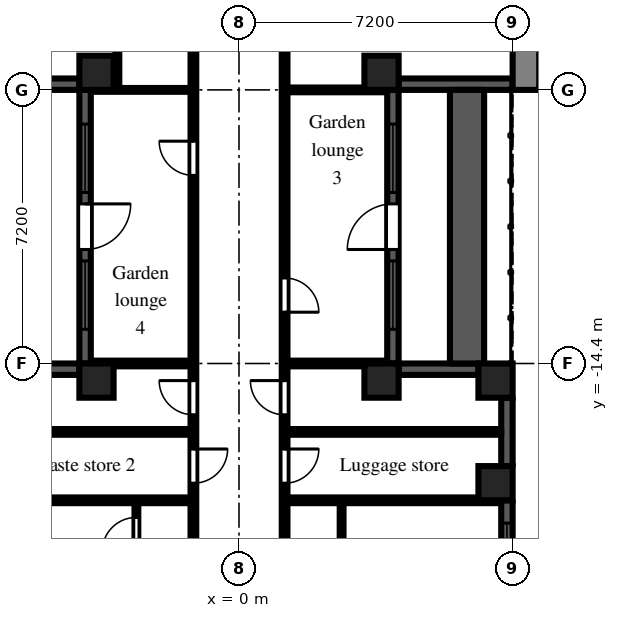
"""IFC4 building model, lengths in metres.
Left out: names, types, materials, properties, quantities, classifications, styles, units other than length and angle.
Written with IfcOpenShell. Run it as: python <this file> out.ifc"""

import sys

from ifc_helpers import new_model, si_unit, direction, frame, frame_2d, origin, origin_2d, place, context, subcontext, project, spatial, rectangle, extrude, element, fill, save


model = new_model("IFC4")
c1 = context("Model", 3, precision=1e-05, world=origin(), true_north=direction((0.0, 1.0)))
c2 = subcontext(c1, "Body", "Model", "MODEL_VIEW")
j1 = project(units=[si_unit("LENGTHUNIT", "METRE"), si_unit("PLANEANGLEUNIT", "RADIAN")], contexts=[c1])
p1 = place(None, origin())
s1 = spatial("IfcSite", under=j1, at=p1, CompositionType="ELEMENT")
p2 = place(p1, origin())
s2 = spatial("IfcBuilding", under=s1, at=p2, CompositionType="ELEMENT")
p3 = place(p2, frame((0.0, 0.0, 108.9)))
s3 = spatial("IfcBuildingStorey", under=s2, at=p3, CompositionType="ELEMENT", Elevation=108.9)
for number, where, z_axis, x_axis in (
    (1, (-3.75, -14.85, 0.0), (0.0, 0.0, 1.0), (1.0, 0.0, 0.0)),
    (2, (-3.75, -6.75, 0.0), (0.0, 0.0, 1.0), (1.0, 0.0, 0.0)),
    (3, (3.75, -14.85, 0.0), (0.0, 0.0, 1.0), (1.0, 0.0, 0.0)),
    (4, (3.75, -6.75, 0.0), (0.0, 0.0, 1.0), (1.0, 0.0, 0.0)),
    (5, (6.75, -17.55, 0.0), (0.0, 0.0, 1.0), (1.0, 0.0, 0.0)),
    (6, (6.75, -14.85, 0.0), (0.0, 0.0, 1.0), (1.0, 0.0, 0.0)),
):
    element("IfcColumn", number, at=place(p3, frame(where, z_axis=z_axis, x_axis=x_axis)), inside=s3, PredefinedType="COLUMN", context=c2, shape_type="SweptSolid", body=[
        extrude(rectangle(XDim=0.9, YDim=0.9, at=origin_2d()), origin(), (0.0, 0.0, 1.0), 3.0),
    ])
p4 = place(p3, frame((-7.2, -7.05, 0.0), z_axis=(0.0, 0.0, 1.0), x_axis=(1.0, 0.0, 0.0)))
e7 = element("IfcWall", 7, at=p4, inside=s3, PredefinedType="SOLIDWALL", context=c2, shape_type="SweptSolid", body=[
    extrude(rectangle(XDim=3.0, YDim=0.3, at=frame_2d((1.5, 0.0))), origin(), (0.0, 0.0, 1.0), 2.55),
])
p5 = place(p3, frame((-4.05, -7.2, 0.0), z_axis=(0.0, 0.0, 1.0), x_axis=(0.0, -1.0, 0.0)))
e8 = element("IfcWall", 8, at=p5, inside=s3, PredefinedType="SOLIDWALL", context=c2, shape_type="SweptSolid", body=[
    extrude(rectangle(XDim=7.2, YDim=0.3, at=frame_2d((3.6, 0.0))), origin(), (0.0, 0.0, 1.0), 2.55),
])
p6 = place(p5, frame((3.0, 0.0, 0.0)))
e9 = element("IfcOpeningElement", 9, at=p6, cuts=e8, PredefinedType="OPENING", context=c2, shape_type="SweptSolid", body=[
    extrude(rectangle(XDim=1.2, YDim=2.05, at=frame_2d((0.6, 1.025))), frame((0.0, 0.16, 0.0), z_axis=(0.0, -1.0, 0.0), x_axis=(1.0, 0.0, 0.0)), (0.0, 0.0, 1.0), 0.32),
])
p7 = place(p5, frame((0.9, 0.0, 0.2)))
e10 = element("IfcOpeningElement", 10, at=p7, cuts=e8, PredefinedType="OPENING", context=c2, shape_type="SweptSolid", body=[
    extrude(rectangle(XDim=1.8, YDim=1.85, at=frame_2d((0.9, 0.925))), frame((0.0, 0.16, 0.0), z_axis=(0.0, -1.0, 0.0), x_axis=(1.0, 0.0, 0.0)), (0.0, 0.0, 1.0), 0.32),
])
p8 = place(p5, frame((4.5, 0.0, 0.2)))
e11 = element("IfcOpeningElement", 11, at=p8, cuts=e8, PredefinedType="OPENING", context=c2, shape_type="SweptSolid", body=[
    extrude(rectangle(XDim=1.8, YDim=1.85, at=frame_2d((0.9, 0.925))), frame((0.0, 0.16, 0.0), z_axis=(0.0, -1.0, 0.0), x_axis=(1.0, 0.0, 0.0)), (0.0, 0.0, 1.0), 0.32),
])
p9 = place(p3, frame((-4.2, -14.55, 0.0), z_axis=(0.0, 0.0, 1.0), x_axis=(-1.0, 0.0, 0.0)))
e12 = element("IfcWall", 12, at=p9, inside=s3, PredefinedType="SOLIDWALL", context=c2, shape_type="SweptSolid", body=[
    extrude(rectangle(XDim=2.1, YDim=0.3, at=frame_2d((1.05, 0.0))), origin(), (0.0, 0.0, 1.0), 2.55),
])
p10 = place(p3, frame((7.05, -21.15, 0.0), z_axis=(0.0, 0.0, 1.0), x_axis=(0.0, 1.0, 0.0)))
e13 = element("IfcWall", 13, at=p10, inside=s3, PredefinedType="SOLIDWALL", context=c2, shape_type="SweptSolid", body=[
    extrude(rectangle(XDim=3.15, YDim=0.3, at=frame_2d((1.575, 0.0))), origin(), (0.0, 0.0, 1.0), 2.2),
])
p11 = place(p10, frame((0.15, 0.0, 0.2)))
e14 = element("IfcOpeningElement", 14, at=p11, cuts=e13, PredefinedType="OPENING", context=c2, shape_type="SweptSolid", body=[
    extrude(rectangle(XDim=2.4, YDim=1.85, at=frame_2d((1.2, 0.925))), frame((0.0, 0.16, 0.0), z_axis=(0.0, -1.0, 0.0), x_axis=(1.0, 0.0, 0.0)), (0.0, 0.0, 1.0), 0.32),
])
p12 = place(p3, frame((7.05, -17.1, 0.0), z_axis=(0.0, 0.0, 1.0), x_axis=(0.0, 1.0, 0.0)))
e15 = element("IfcWall", 15, at=p12, inside=s3, PredefinedType="SOLIDWALL", context=c2, shape_type="SweptSolid", body=[
    extrude(rectangle(XDim=1.8, YDim=0.3, at=frame_2d((0.9, 0.0))), origin(), (0.0, 0.0, 1.0), 2.2),
])
p13 = place(p3, frame((6.3, -14.55, 0.0), z_axis=(0.0, 0.0, 1.0), x_axis=(-1.0, 0.0, 0.0)))
e16 = element("IfcWall", 16, at=p13, inside=s3, PredefinedType="SOLIDWALL", context=c2, shape_type="SweptSolid", body=[
    extrude(rectangle(XDim=2.1, YDim=0.3, at=frame_2d((1.05, 0.0))), origin(), (0.0, 0.0, 1.0), 2.55),
])
p14 = place(p3, frame((4.05, -14.4, 0.0), z_axis=(0.0, 0.0, 1.0), x_axis=(0.0, 1.0, 0.0)))
e17 = element("IfcWall", 17, at=p14, inside=s3, PredefinedType="SOLIDWALL", context=c2, shape_type="SweptSolid", body=[
    extrude(rectangle(XDim=7.2, YDim=0.3, at=frame_2d((3.6, 0.0))), origin(), (0.0, 0.0, 1.0), 2.55),
])
p15 = place(p14, frame((3.0, 0.0, 0.0)))
e18 = element("IfcOpeningElement", 18, at=p15, cuts=e17, PredefinedType="OPENING", context=c2, shape_type="SweptSolid", body=[
    extrude(rectangle(XDim=1.2, YDim=2.05, at=frame_2d((0.6, 1.025))), frame((0.0, 0.16, 0.0), z_axis=(0.0, -1.0, 0.0), x_axis=(1.0, 0.0, 0.0)), (0.0, 0.0, 1.0), 0.32),
])
p16 = place(p14, frame((0.9, 0.0, 0.2)))
e19 = element("IfcOpeningElement", 19, at=p16, cuts=e17, PredefinedType="OPENING", context=c2, shape_type="SweptSolid", body=[
    extrude(rectangle(XDim=1.8, YDim=1.85, at=frame_2d((0.9, 0.925))), frame((0.0, 0.16, 0.0), z_axis=(0.0, -1.0, 0.0), x_axis=(1.0, 0.0, 0.0)), (0.0, 0.0, 1.0), 0.32),
])
p17 = place(p14, frame((4.5, 0.0, 0.2)))
e20 = element("IfcOpeningElement", 20, at=p17, cuts=e17, PredefinedType="OPENING", context=c2, shape_type="SweptSolid", body=[
    extrude(rectangle(XDim=1.8, YDim=1.85, at=frame_2d((0.9, 0.925))), frame((0.0, 0.16, 0.0), z_axis=(0.0, -1.0, 0.0), x_axis=(1.0, 0.0, 0.0)), (0.0, 0.0, 1.0), 0.32),
])
p18 = place(p3, frame((4.2, -7.05, 0.0), z_axis=(0.0, 0.0, 1.0), x_axis=(1.0, 0.0, 0.0)))
e21 = element("IfcWall", 21, at=p18, inside=s3, PredefinedType="SOLIDWALL", context=c2, shape_type="SweptSolid", body=[
    extrude(rectangle(XDim=3.0, YDim=0.3, at=frame_2d((1.5, 0.0))), origin(), (0.0, 0.0, 1.0), 2.55),
])
p19 = place(p3, frame((6.0, -14.4, 0.0), z_axis=(0.0, 0.0, 1.0), x_axis=(0.0, 1.0, 0.0)))
e22 = element("IfcWall", 22, at=p19, inside=s3, PredefinedType="PARAPET", context=c2, shape_type="SweptSolid", body=[
    extrude(rectangle(XDim=7.2, YDim=0.9, at=frame_2d((3.6, 0.0))), origin(), (0.0, 0.0, 1.0), 0.8),
])
p20 = place(p3, frame((7.55, -7.2, 0.0), z_axis=(0.0, 0.0, 1.0), x_axis=(0.0, 1.0, 0.0)))
e23 = element("IfcWall", 23, at=p20, inside=s3, PredefinedType="SHEAR", context=c2, shape_type="SweptSolid", body=[
    extrude(rectangle(XDim=14.4, YDim=0.7, at=frame_2d((7.2, 0.0))), origin(), (0.0, 0.0, 1.0), 2.55),
])
p21 = place(p20, frame((6.0, 0.0, 0.0)))
e24 = element("IfcOpeningElement", 24, at=p21, cuts=e23, PredefinedType="OPENING", context=c2, shape_type="SweptSolid", body=[
    extrude(rectangle(XDim=2.4, YDim=2.2, at=frame_2d((1.2, 1.1))), frame((0.0, 0.36, 0.0), z_axis=(0.0, -1.0, 0.0), x_axis=(1.0, 0.0, 0.0)), (0.0, 0.0, 1.0), 0.72),
])
for number, where, z_axis, x_axis in (
    (25, (-6.9, -18.0, 0.0), (0.0, 0.0, 1.0), (1.0, 0.0, 0.0)),
    (26, (-6.9, -16.2, 0.0), (0.0, 0.0, 1.0), (1.0, 0.0, 0.0)),
):
    element("IfcWall", number, at=place(p3, frame(where, z_axis=z_axis, x_axis=x_axis)), inside=s3, PredefinedType="PARTITIONING", context=c2, shape_type="SweptSolid", body=[
        extrude(rectangle(XDim=5.625, YDim=0.15, at=frame_2d((2.812, 0.0))), origin(), (0.0, 0.0, 1.0), 2.55),
    ])
p22 = place(p3, frame((-3.9, -14.4, 0.0), z_axis=(0.0, 0.0, 1.0), x_axis=(1.0, 0.0, 0.0)))
e27 = element("IfcWall", 27, at=p22, inside=s3, PredefinedType="PARTITIONING", context=c2, shape_type="SweptSolid", body=[
    extrude(rectangle(XDim=2.625, YDim=0.15, at=frame_2d((1.312, 0.0))), origin(), (0.0, 0.0, 1.0), 2.55),
])
p23 = place(p3, frame((-3.9, -7.2, 0.0), z_axis=(0.0, 0.0, 1.0), x_axis=(1.0, 0.0, 0.0)))
e28 = element("IfcWall", 28, at=p23, inside=s3, PredefinedType="PARTITIONING", context=c2, shape_type="SweptSolid", body=[
    extrude(rectangle(XDim=2.625, YDim=0.1, at=frame_2d((1.312, 0.0))), origin(), (0.0, 0.0, 1.0), 2.55),
])
p24 = place(p3, frame((-3.2, -7.15, 0.0), z_axis=(0.0, 0.0, 1.0), x_axis=(0.0, 1.0, 0.0)))
e29 = element("IfcWall", 29, at=p24, inside=s3, PredefinedType="PARTITIONING", context=c2, shape_type="SweptSolid", body=[
    extrude(rectangle(XDim=5.875, YDim=0.1, at=frame_2d((2.938, 0.0))), origin(), (0.0, 0.0, 1.0), 2.55),
])
p25 = place(p3, frame((-2.7, -32.35, 0.0), z_axis=(0.0, 0.0, 1.0), x_axis=(0.0, 1.0, 0.0)))
e30 = element("IfcWall", 30, at=p25, inside=s3, PredefinedType="PARTITIONING", context=c2, shape_type="SweptSolid", body=[
    extrude(rectangle(XDim=14.275, YDim=0.1, at=frame_2d((7.138, 0.0))), origin(), (0.0, 0.0, 1.0), 2.55),
])
p26 = place(p25, frame((0.4, 0.0, 0.0)))
e31 = element("IfcOpeningElement", 31, at=p26, cuts=e30, PredefinedType="OPENING", context=c2, shape_type="SweptSolid", body=[
    extrude(rectangle(XDim=0.9, YDim=2.1, at=frame_2d((0.45, 1.05))), frame((0.0, 0.06, 0.0), z_axis=(0.0, -1.0, 0.0), x_axis=(1.0, 0.0, 0.0)), (0.0, 0.0, 1.0), 0.12),
])
p27 = place(p25, frame((5.8, 0.0, 0.0)))
e32 = element("IfcOpeningElement", 32, at=p27, cuts=e30, PredefinedType="OPENING", context=c2, shape_type="SweptSolid", body=[
    extrude(rectangle(XDim=0.9, YDim=2.1, at=frame_2d((0.45, 1.05))), frame((0.0, 0.06, 0.0), z_axis=(0.0, -1.0, 0.0), x_axis=(1.0, 0.0, 0.0)), (0.0, 0.0, 1.0), 0.12),
])
p28 = place(p25, frame((7.6, 0.0, 0.0)))
e33 = element("IfcOpeningElement", 33, at=p28, cuts=e30, PredefinedType="OPENING", context=c2, shape_type="SweptSolid", body=[
    extrude(rectangle(XDim=0.9, YDim=2.1, at=frame_2d((0.45, 1.05))), frame((0.0, 0.06, 0.0), z_axis=(0.0, -1.0, 0.0), x_axis=(1.0, 0.0, 0.0)), (0.0, 0.0, 1.0), 0.12),
])
p29 = place(p25, frame((13.0, 0.0, 0.0)))
e34 = element("IfcOpeningElement", 34, at=p29, cuts=e30, PredefinedType="OPENING", context=c2, shape_type="SweptSolid", body=[
    extrude(rectangle(XDim=0.9, YDim=2.1, at=frame_2d((0.45, 1.05))), frame((0.0, 0.06, 0.0), z_axis=(0.0, -1.0, 0.0), x_axis=(1.0, 0.0, 0.0)), (0.0, 0.0, 1.0), 0.12),
])
p30 = place(p3, frame((-1.2, -36.5, 0.0), z_axis=(0.0, 0.0, 1.0), x_axis=(0.0, 1.0, 0.0)))
e35 = element("IfcWall", 35, at=p30, inside=s3, PredefinedType="PARTITIONING", context=c2, shape_type="SweptSolid", body=[
    extrude(rectangle(XDim=35.225, YDim=0.15, at=frame_2d((17.613, 0.0))), origin(), (0.0, 0.0, 1.0), 2.55),
])
p31 = place(p30, frame((31.85, 0.0, 0.0)))
e36 = element("IfcOpeningElement", 36, at=p31, cuts=e35, PredefinedType="OPENING", context=c2, shape_type="SweptSolid", body=[
    extrude(rectangle(XDim=0.9, YDim=2.1, at=frame_2d((0.45, 1.05))), frame((0.0, 0.085, 0.0), z_axis=(0.0, -1.0, 0.0), x_axis=(1.0, 0.0, 0.0)), (0.0, 0.0, 1.0), 0.17),
])
p32 = place(p30, frame((27.05, 0.0, 0.0)))
e37 = element("IfcOpeningElement", 37, at=p32, cuts=e35, PredefinedType="OPENING", context=c2, shape_type="SweptSolid", body=[
    extrude(rectangle(XDim=0.9, YDim=2.1, at=frame_2d((0.45, 1.05))), frame((0.0, 0.085, 0.0), z_axis=(0.0, -1.0, 0.0), x_axis=(1.0, 0.0, 0.0)), (0.0, 0.0, 1.0), 0.17),
])
p33 = place(p30, frame((20.75, 0.0, 0.0)))
e38 = element("IfcOpeningElement", 38, at=p33, cuts=e35, PredefinedType="OPENING", context=c2, shape_type="SweptSolid", body=[
    extrude(rectangle(XDim=0.9, YDim=2.1, at=frame_2d((0.45, 1.05))), frame((0.0, 0.085, 0.0), z_axis=(0.0, -1.0, 0.0), x_axis=(1.0, 0.0, 0.0)), (0.0, 0.0, 1.0), 0.17),
])
p34 = place(p30, frame((18.95, 0.0, 0.0)))
e39 = element("IfcOpeningElement", 39, at=p34, cuts=e35, PredefinedType="OPENING", context=c2, shape_type="SweptSolid", body=[
    extrude(rectangle(XDim=0.9, YDim=2.1, at=frame_2d((0.45, 1.05))), frame((0.0, 0.085, 0.0), z_axis=(0.0, -1.0, 0.0), x_axis=(1.0, 0.0, 0.0)), (0.0, 0.0, 1.0), 0.17),
])
p35 = place(p30, frame((1.55, 0.0, 0.0)))
e40 = element("IfcOpeningElement", 40, at=p35, cuts=e35, PredefinedType="OPENING", context=c2, shape_type="SweptSolid", body=[
    extrude(rectangle(XDim=1.0, YDim=2.1, at=frame_2d((0.5, 1.05))), frame((0.0, 0.085, 0.0), z_axis=(0.0, -1.0, 0.0), x_axis=(1.0, 0.0, 0.0)), (0.0, 0.0, 1.0), 0.17),
])
p36 = place(p3, frame((1.2, -36.5, 0.0), z_axis=(0.0, 0.0, 1.0), x_axis=(0.0, 1.0, 0.0)))
e41 = element("IfcWall", 41, at=p36, inside=s3, PredefinedType="PARTITIONING", context=c2, shape_type="SweptSolid", body=[
    extrude(rectangle(XDim=35.375, YDim=0.15, at=frame_2d((17.688, 0.0))), origin(), (0.0, 0.0, 1.0), 2.55),
])
p37 = place(p36, frame((33.65, 0.0, 0.0)))
e42 = element("IfcOpeningElement", 42, at=p37, cuts=e41, PredefinedType="OPENING", context=c2, shape_type="SweptSolid", body=[
    extrude(rectangle(XDim=0.9, YDim=2.1, at=frame_2d((0.45, 1.05))), frame((0.0, 0.085, 0.0), z_axis=(0.0, -1.0, 0.0), x_axis=(1.0, 0.0, 0.0)), (0.0, 0.0, 1.0), 0.17),
])
p38 = place(p36, frame((30.65, 0.0, 0.0)))
e43 = element("IfcOpeningElement", 43, at=p38, cuts=e41, PredefinedType="OPENING", context=c2, shape_type="SweptSolid", body=[
    extrude(rectangle(XDim=0.9, YDim=2.1, at=frame_2d((0.45, 1.05))), frame((0.0, 0.085, 0.0), z_axis=(0.0, -1.0, 0.0), x_axis=(1.0, 0.0, 0.0)), (0.0, 0.0, 1.0), 0.17),
])
p39 = place(p36, frame((23.45, 0.0, 0.0)))
e44 = element("IfcOpeningElement", 44, at=p39, cuts=e41, PredefinedType="OPENING", context=c2, shape_type="SweptSolid", body=[
    extrude(rectangle(XDim=0.9, YDim=2.1, at=frame_2d((0.45, 1.05))), frame((0.0, 0.085, 0.0), z_axis=(0.0, -1.0, 0.0), x_axis=(1.0, 0.0, 0.0)), (0.0, 0.0, 1.0), 0.17),
])
p40 = place(p36, frame((20.75, 0.0, 0.0)))
e45 = element("IfcOpeningElement", 45, at=p40, cuts=e41, PredefinedType="OPENING", context=c2, shape_type="SweptSolid", body=[
    extrude(rectangle(XDim=0.9, YDim=2.1, at=frame_2d((0.45, 1.05))), frame((0.0, 0.085, 0.0), z_axis=(0.0, -1.0, 0.0), x_axis=(1.0, 0.0, 0.0)), (0.0, 0.0, 1.0), 0.17),
])
p41 = place(p36, frame((18.95, 0.0, 0.0)))
e46 = element("IfcOpeningElement", 46, at=p41, cuts=e41, PredefinedType="OPENING", context=c2, shape_type="SweptSolid", body=[
    extrude(rectangle(XDim=0.9, YDim=2.1, at=frame_2d((0.45, 1.05))), frame((0.0, 0.085, 0.0), z_axis=(0.0, -1.0, 0.0), x_axis=(1.0, 0.0, 0.0)), (0.0, 0.0, 1.0), 0.17),
])
p42 = place(p36, frame((1.55, 0.0, 0.0)))
e47 = element("IfcOpeningElement", 47, at=p42, cuts=e41, PredefinedType="OPENING", context=c2, shape_type="SweptSolid", body=[
    extrude(rectangle(XDim=1.0, YDim=2.1, at=frame_2d((0.5, 1.05))), frame((0.0, 0.085, 0.0), z_axis=(0.0, -1.0, 0.0), x_axis=(1.0, 0.0, 0.0)), (0.0, 0.0, 1.0), 0.17),
])
for number, where, z_axis, x_axis in (
    (48, (1.275, -18.0, 0.0), (0.0, 0.0, 1.0), (1.0, 0.0, 0.0)),
    (49, (1.275, -16.2, 0.0), (0.0, 0.0, 1.0), (1.0, 0.0, 0.0)),
):
    element("IfcWall", number, at=place(p3, frame(where, z_axis=z_axis, x_axis=x_axis)), inside=s3, PredefinedType="PARTITIONING", context=c2, shape_type="SweptSolid", body=[
        extrude(rectangle(XDim=5.625, YDim=0.15, at=frame_2d((2.812, 0.0))), origin(), (0.0, 0.0, 1.0), 2.55),
    ])
p43 = place(p3, frame((1.275, -14.4, 0.0), z_axis=(0.0, 0.0, 1.0), x_axis=(1.0, 0.0, 0.0)))
e50 = element("IfcWall", 50, at=p43, inside=s3, PredefinedType="PARTITIONING", context=c2, shape_type="SweptSolid", body=[
    extrude(rectangle(XDim=2.625, YDim=0.15, at=frame_2d((1.312, 0.0))), origin(), (0.0, 0.0, 1.0), 2.55),
])
p44 = place(p3, frame((1.275, -7.2, 0.0), z_axis=(0.0, 0.0, 1.0), x_axis=(1.0, 0.0, 0.0)))
e51 = element("IfcWall", 51, at=p44, inside=s3, PredefinedType="PARTITIONING", context=c2, shape_type="SweptSolid", body=[
    extrude(rectangle(XDim=2.625, YDim=0.125, at=frame_2d((1.312, 0.0))), origin(), (0.0, 0.0, 1.0), 2.55),
])
p45 = place(p3, frame((2.7, -32.35, 0.0), z_axis=(0.0, 0.0, 1.0), x_axis=(0.0, 1.0, 0.0)))
e52 = element("IfcWall", 52, at=p45, inside=s3, PredefinedType="PARTITIONING", context=c2, shape_type="SweptSolid", body=[
    extrude(rectangle(XDim=14.275, YDim=0.1, at=frame_2d((7.138, 0.0))), origin(), (0.0, 0.0, 1.0), 2.55),
])
p46 = place(p45, frame((1.12, 0.0, 0.0)))
e53 = element("IfcOpeningElement", 53, at=p46, cuts=e52, PredefinedType="OPENING", context=c2, shape_type="SweptSolid", body=[
    extrude(rectangle(XDim=0.9, YDim=2.1, at=frame_2d((0.45, 1.05))), frame((0.0, 0.06, 0.0), z_axis=(0.0, -1.0, 0.0), x_axis=(1.0, 0.0, 0.0)), (0.0, 0.0, 1.0), 0.12),
])
p47 = place(p45, frame((12.28, 0.0, 0.0)))
e54 = element("IfcOpeningElement", 54, at=p47, cuts=e52, PredefinedType="OPENING", context=c2, shape_type="SweptSolid", body=[
    extrude(rectangle(XDim=0.9, YDim=2.1, at=frame_2d((0.45, 1.05))), frame((0.0, 0.06, 0.0), z_axis=(0.0, -1.0, 0.0), x_axis=(1.0, 0.0, 0.0)), (0.0, 0.0, 1.0), 0.12),
])
p48 = place(p6, origin())
e55 = element("IfcDoor", 55, at=p48, inside=s3, OperationType="SINGLE_SWING_LEFT", PredefinedType="DOOR", context=c2, shape_type="SweptSolid", body=[
    extrude(rectangle(XDim=1.2, YDim=2.05, at=frame_2d((0.6, 1.025))), frame((0.0, 0.025, 0.0), z_axis=(0.0, -1.0, 0.0), x_axis=(1.0, 0.0, 0.0)), (0.0, 0.0, 1.0), 0.05),
])
fill(e9, e55)
p49 = place(p7, origin())
e56 = element("IfcWindow", 56, at=p49, inside=s3, PartitioningType="SINGLE_PANEL", PredefinedType="WINDOW", context=c2, shape_type="SweptSolid", body=[
    extrude(rectangle(XDim=1.8, YDim=1.85, at=frame_2d((0.9, 0.925))), frame((0.0, 0.03, 0.0), z_axis=(0.0, -1.0, 0.0), x_axis=(1.0, 0.0, 0.0)), (0.0, 0.0, 1.0), 0.06),
])
fill(e10, e56)
p50 = place(p8, origin())
e57 = element("IfcWindow", 57, at=p50, inside=s3, PartitioningType="SINGLE_PANEL", PredefinedType="WINDOW", context=c2, shape_type="SweptSolid", body=[
    extrude(rectangle(XDim=1.8, YDim=1.85, at=frame_2d((0.9, 0.925))), frame((0.0, 0.03, 0.0), z_axis=(0.0, -1.0, 0.0), x_axis=(1.0, 0.0, 0.0)), (0.0, 0.0, 1.0), 0.06),
])
fill(e11, e57)
p51 = place(p11, origin())
e58 = element("IfcWindow", 58, at=p51, inside=s3, PartitioningType="SINGLE_PANEL", PredefinedType="WINDOW", context=c2, shape_type="SweptSolid", body=[
    extrude(rectangle(XDim=2.4, YDim=1.85, at=frame_2d((1.2, 0.925))), frame((0.0, 0.03, 0.0), z_axis=(0.0, -1.0, 0.0), x_axis=(1.0, 0.0, 0.0)), (0.0, 0.0, 1.0), 0.06),
])
fill(e14, e58)
p52 = place(p15, origin())
e59 = element("IfcDoor", 59, at=p52, inside=s3, OperationType="SINGLE_SWING_LEFT", PredefinedType="DOOR", context=c2, shape_type="SweptSolid", body=[
    extrude(rectangle(XDim=1.2, YDim=2.05, at=frame_2d((0.6, 1.025))), frame((0.0, 0.025, 0.0), z_axis=(0.0, -1.0, 0.0), x_axis=(1.0, 0.0, 0.0)), (0.0, 0.0, 1.0), 0.05),
])
fill(e18, e59)
p53 = place(p16, origin())
e60 = element("IfcWindow", 60, at=p53, inside=s3, PartitioningType="SINGLE_PANEL", PredefinedType="WINDOW", context=c2, shape_type="SweptSolid", body=[
    extrude(rectangle(XDim=1.8, YDim=1.85, at=frame_2d((0.9, 0.925))), frame((0.0, 0.03, 0.0), z_axis=(0.0, -1.0, 0.0), x_axis=(1.0, 0.0, 0.0)), (0.0, 0.0, 1.0), 0.06),
])
fill(e19, e60)
p54 = place(p17, origin())
e61 = element("IfcWindow", 61, at=p54, inside=s3, PartitioningType="SINGLE_PANEL", PredefinedType="WINDOW", context=c2, shape_type="SweptSolid", body=[
    extrude(rectangle(XDim=1.8, YDim=1.85, at=frame_2d((0.9, 0.925))), frame((0.0, 0.03, 0.0), z_axis=(0.0, -1.0, 0.0), x_axis=(1.0, 0.0, 0.0)), (0.0, 0.0, 1.0), 0.06),
])
fill(e20, e61)
p55 = place(p39, frame((0.9, 0.0, 0.0), z_axis=(0.0, 0.0, 1.0), x_axis=(-1.0, 0.0, 0.0)))
e62 = element("IfcDoor", 62, at=p55, inside=s3, OperationType="SINGLE_SWING_RIGHT", PredefinedType="DOOR", context=c2, shape_type="SweptSolid", body=[
    extrude(rectangle(XDim=0.9, YDim=2.1, at=frame_2d((0.45, 1.05))), frame((0.0, 0.025, 0.0), z_axis=(0.0, -1.0, 0.0), x_axis=(1.0, 0.0, 0.0)), (0.0, 0.0, 1.0), 0.05),
])
fill(e44, e62)
p56 = place(p40, origin())
e63 = element("IfcDoor", 63, at=p56, inside=s3, OperationType="SINGLE_SWING_RIGHT", PredefinedType="DOOR", context=c2, shape_type="SweptSolid", body=[
    extrude(rectangle(XDim=0.9, YDim=2.1, at=frame_2d((0.45, 1.05))), frame((0.0, 0.025, 0.0), z_axis=(0.0, -1.0, 0.0), x_axis=(1.0, 0.0, 0.0)), (0.0, 0.0, 1.0), 0.05),
])
fill(e45, e63)
p57 = place(p41, frame((0.9, 0.0, 0.0), z_axis=(0.0, 0.0, 1.0), x_axis=(-1.0, 0.0, 0.0)))
e64 = element("IfcDoor", 64, at=p57, inside=s3, OperationType="SINGLE_SWING_LEFT", PredefinedType="DOOR", context=c2, shape_type="SweptSolid", body=[
    extrude(rectangle(XDim=0.9, YDim=2.1, at=frame_2d((0.45, 1.05))), frame((0.0, 0.025, 0.0), z_axis=(0.0, -1.0, 0.0), x_axis=(1.0, 0.0, 0.0)), (0.0, 0.0, 1.0), 0.05),
])
fill(e46, e64)
p58 = place(p32, origin())
e65 = element("IfcDoor", 65, at=p58, inside=s3, OperationType="SINGLE_SWING_RIGHT", PredefinedType="DOOR", context=c2, shape_type="SweptSolid", body=[
    extrude(rectangle(XDim=0.9, YDim=2.1, at=frame_2d((0.45, 1.05))), frame((0.0, 0.025, 0.0), z_axis=(0.0, -1.0, 0.0), x_axis=(1.0, 0.0, 0.0)), (0.0, 0.0, 1.0), 0.05),
])
fill(e37, e65)
p59 = place(p33, origin())
e66 = element("IfcDoor", 66, at=p59, inside=s3, OperationType="SINGLE_SWING_RIGHT", PredefinedType="DOOR", context=c2, shape_type="SweptSolid", body=[
    extrude(rectangle(XDim=0.9, YDim=2.1, at=frame_2d((0.45, 1.05))), frame((0.0, 0.025, 0.0), z_axis=(0.0, -1.0, 0.0), x_axis=(1.0, 0.0, 0.0)), (0.0, 0.0, 1.0), 0.05),
])
fill(e38, e66)
p60 = place(p34, frame((0.9, 0.0, 0.0), z_axis=(0.0, 0.0, 1.0), x_axis=(-1.0, 0.0, 0.0)))
e67 = element("IfcDoor", 67, at=p60, inside=s3, OperationType="SINGLE_SWING_LEFT", PredefinedType="DOOR", context=c2, shape_type="SweptSolid", body=[
    extrude(rectangle(XDim=0.9, YDim=2.1, at=frame_2d((0.45, 1.05))), frame((0.0, 0.025, 0.0), z_axis=(0.0, -1.0, 0.0), x_axis=(1.0, 0.0, 0.0)), (0.0, 0.0, 1.0), 0.05),
])
fill(e39, e67)
p61 = place(p29, origin())
e68 = element("IfcDoor", 68, at=p61, inside=s3, OperationType="SINGLE_SWING_LEFT", PredefinedType="DOOR", context=c2, shape_type="SweptSolid", body=[
    extrude(rectangle(XDim=0.9, YDim=2.1, at=frame_2d((0.45, 1.05))), frame((0.0, 0.025, 0.0), z_axis=(0.0, -1.0, 0.0), x_axis=(1.0, 0.0, 0.0)), (0.0, 0.0, 1.0), 0.05),
])
fill(e34, e68)
save(model, sys.argv[1])
